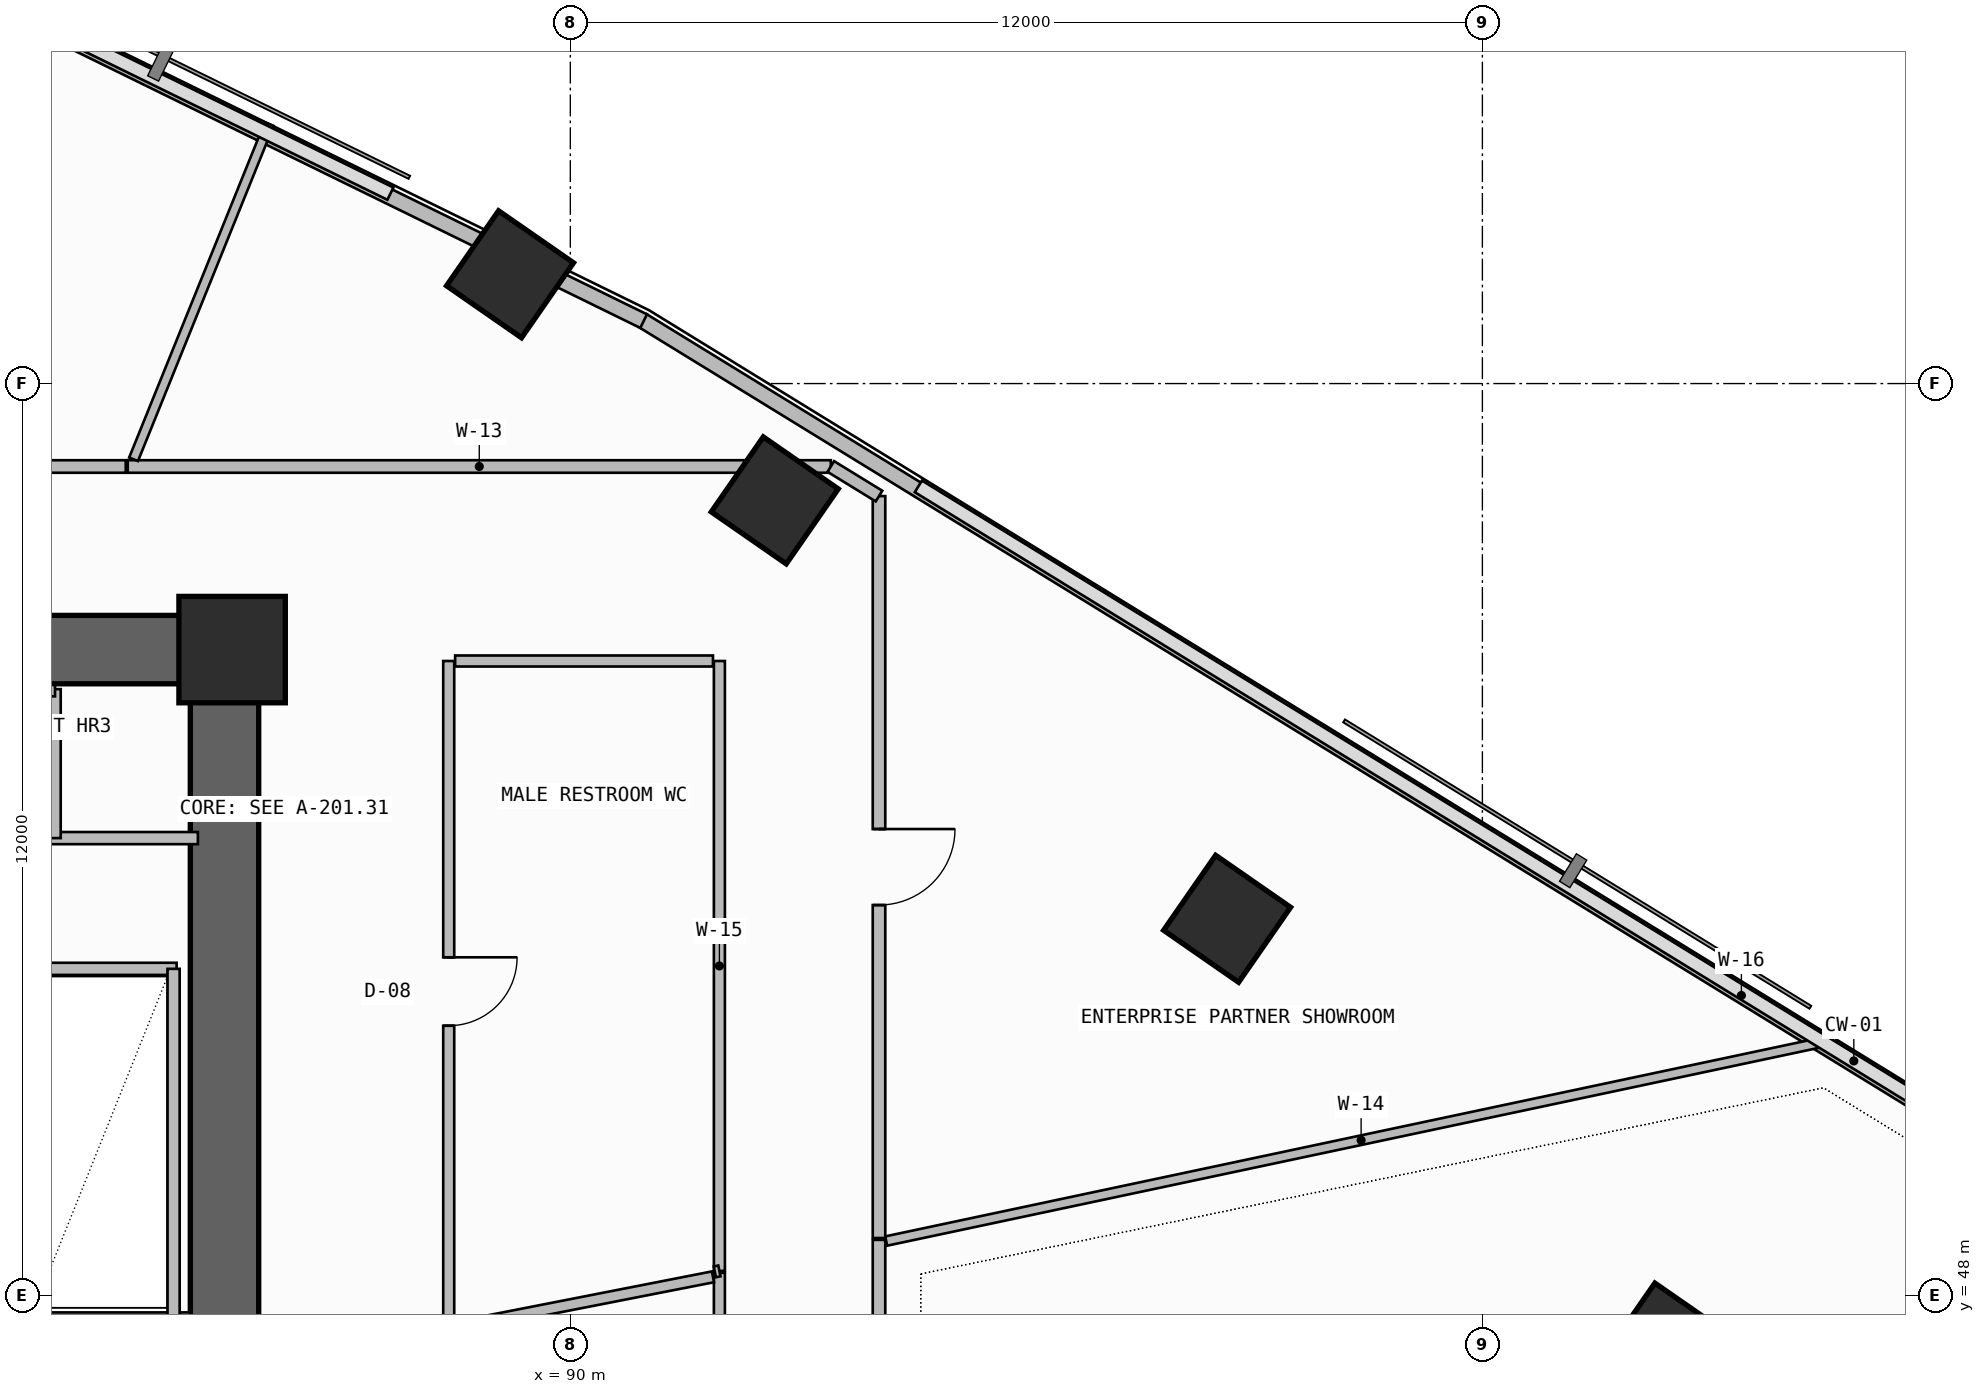
"""IFC4 building model, lengths in metres.
Left out: names, types, materials, properties, quantities, classifications, styles, units other than length and angle.
Written with IfcOpenShell. Run it as: python <this file> out.ifc"""

import sys

from ifc_helpers import new_model, si_unit, direction, frame, frame_2d, origin, origin_2d, place, context, subcontext, project, spatial, rectangle, extrude, element, fill, save


model = new_model("IFC4")
c1 = context("Model", 3, precision=1e-05, world=origin(), true_north=direction((0.0, 1.0)))
c2 = subcontext(c1, "Body", "Model", "MODEL_VIEW")
j1 = project(units=[si_unit("LENGTHUNIT", "METRE"), si_unit("PLANEANGLEUNIT", "RADIAN")], contexts=[c1])
p1 = place(None, origin())
s1 = spatial("IfcSite", under=j1, at=p1, CompositionType="ELEMENT")
p2 = place(p1, origin())
s2 = spatial("IfcBuilding", under=s1, at=p2, CompositionType="ELEMENT")
p3 = place(p2, frame((0.0, 0.0, 110.1)))
s3 = spatial("IfcBuildingStorey", under=s2, at=p3, CompositionType="ELEMENT", Elevation=110.1)
p4 = place(p3, frame((72.0, 56.5, -0.26), z_axis=(0.0, 0.0, 1.0), x_axis=(1.0, 0.0, 0.0)))
e1 = element("IfcWall", 1, at=p4, inside=s3, PredefinedType="SHEAR", context=c2, shape_type="SweptSolid", body=[
    extrude(rectangle(XDim=13.9, YDim=0.9, at=frame_2d((6.95, 0.0))), origin(), (0.0, 0.0, 1.0), 3.6),
])
p5 = place(p3, frame((85.45, 47.6, -0.26), z_axis=(0.0, 0.0, 1.0), x_axis=(0.0, 1.0, 0.0)))
e2 = element("IfcWall", 2, at=p5, inside=s3, PredefinedType="SHEAR", context=c2, shape_type="SweptSolid", body=[
    extrude(rectangle(XDim=8.45, YDim=0.9, at=frame_2d((4.225, 0.0))), origin(), (0.0, 0.0, 1.0), 3.6),
])
p6 = place(p3, frame((85.55, 56.5, 0.0), z_axis=(0.0, 0.0, 1.0), x_axis=(1.0, 0.0, 0.0)))
e3 = element("IfcColumn", 3, at=p6, inside=s3, PredefinedType="COLUMN", context=c2, shape_type="SweptSolid", body=[
    extrude(rectangle(XDim=1.4, YDim=1.4, at=origin_2d()), origin(), (0.0, 0.0, 1.0), 3.6),
])
for number, where, z_axis, x_axis in (
    (4, (104.42, 47.331, 0.0), (0.0, 0.0, 1.0), (0.57, 0.822, 0.0)),
    (5, (98.641, 52.958, 0.0), (0.0, 0.0, 1.0), (0.57, 0.822, 0.0)),
    (6, (92.69, 58.463, 0.0), (0.0, 0.0, 1.0), (0.57, 0.822, 0.0)),
    (7, (89.207, 61.438, 0.0), (0.0, 0.0, 1.0), (0.57, 0.822, 0.0)),
):
    element("IfcColumn", number, at=place(p3, frame(where, z_axis=z_axis, x_axis=x_axis)), inside=s3, PredefinedType="COLUMN", context=c2, shape_type="SweptSolid", body=[
        extrude(rectangle(XDim=1.2, YDim=1.2, at=origin_2d()), origin(), (0.0, 0.0, 1.0), 3.6),
    ])
p7 = place(p3, frame((119.865, 43.07, 0.0), z_axis=(0.0, 0.0, 1.0), x_axis=(-0.852110824326, 0.52336138859, 0.0)))
e8 = element("IfcWall", 8, at=p7, inside=s3, PredefinedType="PARAPET", context=c2, shape_type="SweptSolid", body=[
    extrude(rectangle(XDim=33.932, YDim=0.2, at=frame_2d((16.966, 0.0))), origin(), (0.0, 0.0, 1.0), 1.15),
])
p8 = place(p3, frame((90.964, 60.822, 0.0), z_axis=(0.0, 0.0, 1.0), x_axis=(-0.898000468284, 0.439994498787, 0.0)))
e9 = element("IfcWall", 9, at=p8, inside=s3, PredefinedType="PARAPET", context=c2, shape_type="SweptSolid", body=[
    extrude(rectangle(XDim=1.423, YDim=0.2, at=frame_2d((0.712, 0.0))), origin(), (0.0, 0.0, 1.0), 1.15),
])
p9 = place(p3, frame((88.921, 61.823, 0.0), z_axis=(0.0, 0.0, 1.0), x_axis=(-0.897993533426, 0.440008652103, 0.0)))
e10 = element("IfcWall", 10, at=p9, inside=s3, PredefinedType="PARAPET", context=c2, shape_type="SweptSolid", body=[
    extrude(rectangle(XDim=26.864, YDim=0.2, at=frame_2d((13.432, 0.0))), origin(), (0.0, 0.0, 1.0), 1.15),
])
p10 = place(p3, frame((80.6, 47.7, 0.0), z_axis=(0.0, 0.0, 1.0), x_axis=(1.0, 0.0, 0.0)))
e11 = element("IfcWall", 11, at=p10, inside=s3, PredefinedType="SOLIDWALL", context=c2, shape_type="SweptSolid", body=[
    extrude(rectangle(XDim=4.4, YDim=0.16, at=frame_2d((2.2, 0.0))), origin(), (0.0, 0.0, 1.0), 3.34),
])
p11 = place(p3, frame((80.6, 52.3, 0.0), z_axis=(0.0, 0.0, 1.0), x_axis=(1.0, 0.0, 0.0)))
e12 = element("IfcWall", 12, at=p11, inside=s3, PredefinedType="SOLIDWALL", context=c2, shape_type="SweptSolid", body=[
    extrude(rectangle(XDim=4.22, YDim=0.16, at=frame_2d((2.11, 0.0))), origin(), (0.0, 0.0, 1.0), 3.34),
])
p12 = place(p3, frame((84.78, 47.7, 0.0), z_axis=(0.0, 0.0, 1.0), x_axis=(0.0, 1.0, 0.0)))
e13 = element("IfcWall", 13, at=p12, inside=s3, PredefinedType="SOLIDWALL", context=c2, shape_type="SweptSolid", body=[
    extrude(rectangle(XDim=4.6, YDim=0.16, at=frame_2d((2.3, 0.0))), origin(), (0.0, 0.0, 1.0), 3.34),
])
p13 = place(p3, frame((73.02, 54.02, 0.0), z_axis=(0.0, 0.0, 1.0), x_axis=(1.0, 0.0, 0.0)))
e14 = element("IfcWall", 14, at=p13, inside=s3, PredefinedType="SOLIDWALL", context=c2, shape_type="SweptSolid", body=[
    extrude(rectangle(XDim=12.08, YDim=0.16, at=frame_2d((6.04, 0.0))), origin(), (0.0, 0.0, 1.0), 3.34),
])
p14 = place(p3, frame((83.22, 54.02, 0.0), z_axis=(0.0, 0.0, 1.0), x_axis=(0.0, 1.0, 0.0)))
e15 = element("IfcWall", 15, at=p14, inside=s3, PredefinedType="SOLIDWALL", context=c2, shape_type="SweptSolid", body=[
    extrude(rectangle(XDim=1.96, YDim=0.15, at=frame_2d((0.98, 0.0))), origin(), (0.0, 0.0, 1.0), 3.34),
])
p15 = place(p3, frame((76.52, 55.96, 0.0), z_axis=(0.0, 0.0, 1.0), x_axis=(1.0, 0.0, 0.0)))
e16 = element("IfcWall", 16, at=p15, inside=s3, PredefinedType="SOLIDWALL", context=c2, shape_type="SweptSolid", body=[
    extrude(rectangle(XDim=6.7, YDim=0.15, at=frame_2d((3.35, 0.0))), origin(), (0.0, 0.0, 1.0), 3.34),
])
p16 = place(p3, frame((91.961, 48.301, 0.0), z_axis=(0.0, 0.0, 1.0), x_axis=(0.0, -1.0, 0.0)))
e17 = element("IfcWall", 17, at=p16, inside=s3, PredefinedType="PARTITIONING", context=c2, shape_type="SweptSolid", body=[
    extrude(rectangle(XDim=10.079, YDim=0.145, at=frame_2d((5.04, 0.0))), origin(), (0.0, 0.0, 1.0), 2.725),
])
p17 = place(p16, frame((4.59, 0.0, 0.0)))
e18 = element("IfcOpeningElement", 18, at=p17, cuts=e17, PredefinedType="OPENING", context=c2, shape_type="SweptSolid", body=[
    extrude(rectangle(XDim=0.9, YDim=2.1, at=frame_2d((0.45, 1.05))), frame((0.0, 0.083, 0.0), z_axis=(0.0, -1.0, 0.0), x_axis=(1.0, 0.0, 0.0)), (0.0, 0.0, 1.0), 0.165),
])
p18 = place(p3, frame((88.46, 47.579, 0.0), z_axis=(0.0, 0.0, 1.0), x_axis=(0.981352415041, 0.192217162329, 0.0)))
e19 = element("IfcWall", 19, at=p18, inside=s3, PredefinedType="PARTITIONING", context=c2, shape_type="SweptSolid", body=[
    extrude(rectangle(XDim=3.481, YDim=0.145, at=frame_2d((1.741, 0.0))), origin(), (0.0, 0.0, 1.0), 2.875),
])
p19 = place(p3, frame((94.061, 37.128, 0.0), z_axis=(0.0, 0.0, 1.0), x_axis=(0.0, 1.0, 0.0)))
e20 = element("IfcWall", 20, at=p19, inside=s3, PredefinedType="PARTITIONING", context=c2, shape_type="SweptSolid", body=[
    extrude(rectangle(XDim=11.607, YDim=0.165, at=frame_2d((5.803, 0.0))), origin(), (0.0, 0.0, 1.0), 2.725),
])
p20 = place(p19, frame((5.303, 0.0, 0.0)))
e21 = element("IfcOpeningElement", 21, at=p20, cuts=e20, PredefinedType="OPENING", context=c2, shape_type="SweptSolid", body=[
    extrude(rectangle(XDim=1.0, YDim=2.2, at=frame_2d((0.5, 1.1))), frame((0.0, 0.093, 0.0), z_axis=(0.0, -1.0, 0.0), x_axis=(1.0, 0.0, 0.0)), (0.0, 0.0, 1.0), 0.185),
])
p21 = place(p3, frame((94.156, 48.719, 0.0), z_axis=(0.0, 0.0, 1.0), x_axis=(0.978192494571, 0.207700369679, 0.0)))
e22 = element("IfcWall", 22, at=p21, inside=s3, PredefinedType="PARTITIONING", context=c2, shape_type="SweptSolid", body=[
    extrude(rectangle(XDim=12.776, YDim=0.125, at=frame_2d((6.388, 0.0))), origin(), (0.0, 0.0, 1.0), 2.725),
])
p22 = place(p3, frame((94.061, 48.759, 0.0), z_axis=(0.0, 0.0, 1.0), x_axis=(0.0, 1.0, 0.0)))
e23 = element("IfcWall", 23, at=p22, inside=s3, PredefinedType="PARTITIONING", context=c2, shape_type="SweptSolid", body=[
    extrude(rectangle(XDim=9.761, YDim=0.165, at=frame_2d((4.88, 0.0))), origin(), (0.0, 0.0, 1.0), 2.725),
])
p23 = place(p22, frame((4.38, 0.0, 0.0)))
e24 = element("IfcOpeningElement", 24, at=p23, cuts=e23, PredefinedType="OPENING", context=c2, shape_type="SweptSolid", body=[
    extrude(rectangle(XDim=1.0, YDim=2.2, at=frame_2d((0.5, 1.1))), frame((0.0, 0.093, 0.0), z_axis=(0.0, -1.0, 0.0), x_axis=(1.0, 0.0, 0.0)), (0.0, 0.0, 1.0), 0.185),
])
p24 = place(p3, frame((93.427, 58.909, 0.0), z_axis=(0.0, 0.0, 1.0), x_axis=(-1.0, 0.0, 0.0)))
e25 = element("IfcWall", 25, at=p24, inside=s3, PredefinedType="PARTITIONING", context=c2, shape_type="SweptSolid", body=[
    extrude(rectangle(XDim=9.251, YDim=0.165, at=frame_2d((4.625, 0.0))), origin(), (0.0, 0.0, 1.0), 2.725),
])
p25 = place(p3, frame((94.061, 58.52, 0.0), z_axis=(0.0, 0.0, 1.0), x_axis=(-0.85211988458, 0.523346636852, 0.0)))
e26 = element("IfcWall", 26, at=p25, inside=s3, PredefinedType="PARTITIONING", context=c2, shape_type="SweptSolid", body=[
    extrude(rectangle(XDim=0.744, YDim=0.165, at=frame_2d((0.372, 0.0))), origin(), (0.0, 0.0, 1.0), 3.34),
])
p26 = place(p3, frame((84.254, 59.003, 0.0), z_axis=(0.0, 0.0, 1.0), x_axis=(0.374883024876, 0.927072121067, 0.0)))
e27 = element("IfcWall", 27, at=p26, inside=s3, PredefinedType="PARTITIONING", context=c2, shape_type="SweptSolid", body=[
    extrude(rectangle(XDim=4.757, YDim=0.125, at=frame_2d((2.379, 0.0))), origin(), (0.0, 0.0, 1.0), 3.34),
])
p27 = place(p3, frame((88.4, 47.653, 0.0), z_axis=(0.0, 0.0, 1.0), x_axis=(0.0, 1.0, 0.0)))
e28 = element("IfcWall", 28, at=p27, inside=s3, PredefinedType="PARTITIONING", context=c2, shape_type="SweptSolid", body=[
    extrude(rectangle(XDim=8.697, YDim=0.145, at=frame_2d((4.348, 0.0))), origin(), (0.0, 0.0, 1.0), 2.725),
])
p28 = place(p27, frame((3.898, 0.0, 0.0)))
e29 = element("IfcOpeningElement", 29, at=p28, cuts=e28, PredefinedType="OPENING", context=c2, shape_type="SweptSolid", body=[
    extrude(rectangle(XDim=0.9, YDim=2.1, at=frame_2d((0.45, 1.05))), frame((0.0, 0.083, 0.0), z_axis=(0.0, -1.0, 0.0), x_axis=(1.0, 0.0, 0.0)), (0.0, 0.0, 1.0), 0.165),
])
p29 = place(p3, frame((91.961, 56.35, 0.0), z_axis=(0.0, 0.0, 1.0), x_axis=(0.0, -1.0, 0.0)))
e30 = element("IfcWall", 30, at=p29, inside=s3, PredefinedType="PARTITIONING", context=c2, shape_type="SweptSolid", body=[
    extrude(rectangle(XDim=8.024, YDim=0.145, at=frame_2d((4.012, 0.0))), origin(), (0.0, 0.0, 1.0), 2.725),
])
p30 = place(p3, frame((88.485, 56.35, 0.0), z_axis=(0.0, 0.0, 1.0), x_axis=(1.0, 0.0, 0.0)))
e31 = element("IfcWall", 31, at=p30, inside=s3, PredefinedType="PARTITIONING", context=c2, shape_type="SweptSolid", body=[
    extrude(rectangle(XDim=3.392, YDim=0.145, at=frame_2d((1.696, 0.0))), origin(), (0.0, 0.0, 1.0), 2.875),
])
p31 = place(p3, frame((91.961, 48.326, 0.0), z_axis=(0.0, 0.0, 1.0), x_axis=(-0.97980405878, -0.199960011996, 0.0)))
e32 = element("IfcWall", 32, at=p31, inside=s3, PredefinedType="PARTITIONING", context=c2, shape_type="SweptSolid", body=[
    extrude(rectangle(XDim=0.061, YDim=0.145, at=frame_2d((0.031, 0.0))), origin(), (0.0, 0.0, 1.0), 2.875),
])
p32 = place(p3, frame((84.151, 58.909, 0.0), z_axis=(0.0, 0.0, 1.0), x_axis=(-1.0, 0.0, 0.0)))
e33 = element("IfcWall", 33, at=p32, inside=s3, PredefinedType="PARTITIONING", context=c2, shape_type="SweptSolid", body=[
    extrude(rectangle(XDim=9.017, YDim=0.165, at=frame_2d((4.508, 0.0))), origin(), (0.0, 0.0, 1.0), 3.34),
])
p33 = place(p32, frame((4.008, 0.0, 0.0)))
e34 = element("IfcOpeningElement", 34, at=p33, cuts=e33, PredefinedType="OPENING", context=c2, shape_type="SweptSolid", body=[
    extrude(rectangle(XDim=1.0, YDim=2.2, at=frame_2d((0.5, 1.1))), frame((0.0, 0.093, 0.0), z_axis=(0.0, -1.0, 0.0), x_axis=(1.0, 0.0, 0.0)), (0.0, 0.0, 1.0), 0.185),
])
p34 = place(p23, frame((1.0, 0.0, 0.0), z_axis=(0.0, 0.0, 1.0), x_axis=(-1.0, 0.0, 0.0)))
e35 = element("IfcDoor", 35, at=p34, inside=s3, OperationType="SINGLE_SWING_LEFT", PredefinedType="DOOR", context=c2, shape_type="SweptSolid", body=[
    extrude(rectangle(XDim=1.0, YDim=2.2, at=frame_2d((0.5, 1.1))), frame((0.0, 0.025, 0.0), z_axis=(0.0, -1.0, 0.0), x_axis=(1.0, 0.0, 0.0)), (0.0, 0.0, 1.0), 0.05),
])
fill(e24, e35)
p35 = place(p28, frame((0.9, 0.0, 0.0), z_axis=(0.0, 0.0, 1.0), x_axis=(-1.0, 0.0, 0.0)))
e36 = element("IfcDoor", 36, at=p35, inside=s3, OperationType="SINGLE_SWING_LEFT", PredefinedType="DOOR", context=c2, shape_type="SweptSolid", body=[
    extrude(rectangle(XDim=0.9, YDim=2.1, at=frame_2d((0.45, 1.05))), frame((0.0, 0.025, 0.0), z_axis=(0.0, -1.0, 0.0), x_axis=(1.0, 0.0, 0.0)), (0.0, 0.0, 1.0), 0.05),
])
fill(e29, e36)
save(model, sys.argv[1])
